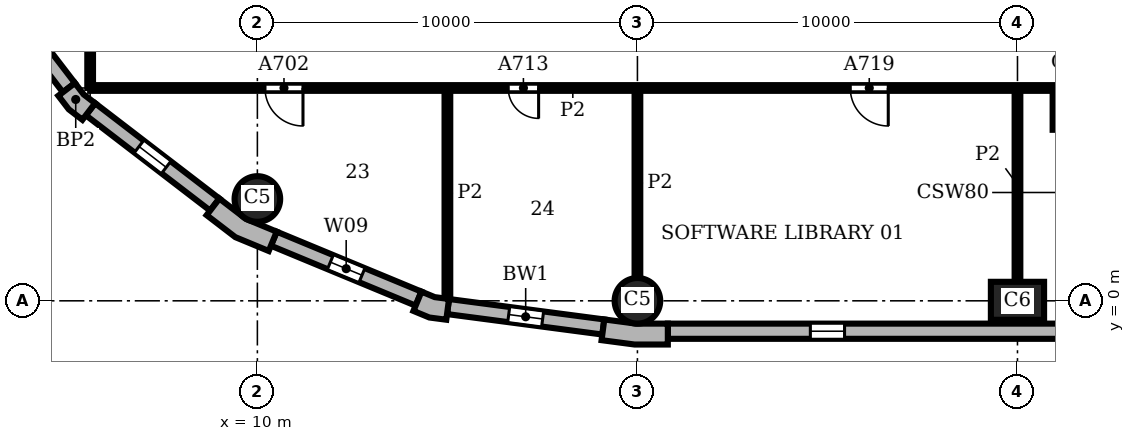
"""IFC4 building model, lengths in metres.
Left out: names, types, materials, properties, quantities, classifications, styles, units other than length and angle.
Written with IfcOpenShell. Run it as: python <this file> out.ifc"""

import sys

from ifc_helpers import new_model, si_unit, direction, frame, frame_2d, origin, origin_2d, place, context, subcontext, project, spatial, polyline, rectangle, circle, outline, extrude, element, fill, save


model = new_model("IFC4")
c1 = context("Model", 3, precision=1e-05, world=origin(), true_north=direction((0.0, 1.0)))
c2 = subcontext(c1, "Body", "Model", "MODEL_VIEW")
j1 = project(units=[si_unit("LENGTHUNIT", "METRE"), si_unit("PLANEANGLEUNIT", "RADIAN")], contexts=[c1])
p1 = place(None, origin())
s1 = spatial("IfcSite", under=j1, at=p1, CompositionType="ELEMENT")
p2 = place(p1, origin())
s2 = spatial("IfcBuilding", under=s1, at=p2, CompositionType="ELEMENT")
p3 = place(p2, frame((0.0, 0.0, 86.1)))
s3 = spatial("IfcBuildingStorey", under=s2, at=p3, CompositionType="ELEMENT", Elevation=86.1)
p4 = place(p3, frame((20.0, 0.0, 0.0), z_axis=(0.0, 0.0, 1.0), x_axis=(1.0, 0.0, 0.0)))
e1 = element("IfcColumn", 1, at=p4, inside=s3, PredefinedType="COLUMN", context=c2, shape_type="SweptSolid", body=[
    extrude(circle(Radius=0.6, at=origin_2d()), origin(), (0.0, 0.0, 1.0), 3.9),
])
p5 = place(p3, frame((30.0, 0.0, 0.0), z_axis=(0.0, 0.0, 1.0), x_axis=(1.0, 0.0, 0.0)))
e2 = element("IfcColumn", 2, at=p5, inside=s3, PredefinedType="COLUMN", context=c2, shape_type="SweptSolid", body=[
    extrude(rectangle(XDim=1.4, YDim=1.0, at=origin_2d()), origin(), (0.0, 0.0, 1.0), 3.9),
])
p6 = place(p3, frame((10.0, 2.679, 0.0), z_axis=(0.0, 0.0, 1.0), x_axis=(1.0, 0.0, 0.0)))
e3 = element("IfcColumn", 3, at=p6, inside=s3, PredefinedType="COLUMN", context=c2, shape_type="SweptSolid", body=[
    extrude(circle(Radius=0.6, at=origin_2d()), origin(), (0.0, 0.0, 1.0), 3.9),
])
p7 = place(p3, origin())
e4 = element("IfcWall", 4, at=p7, inside=s3, PredefinedType="SOLIDWALL", context=c2, shape_type="SweptSolid", body=[
    extrude(outline(polyline([(19.076, -0.887), (19.057, -1.036), (19.925, -1.15), (20.8, -1.15), (20.8, -1.0), (20.8, -0.6), (19.961, -0.6), (19.128, -0.49), (19.076, -0.887)])), origin(), (0.0, 0.0, 1.0), 3.9),
])
e5 = element("IfcWall", 5, at=p7, inside=s3, PredefinedType="SOLIDWALL", context=c2, shape_type="SweptSolid", body=[
    extrude(outline(polyline([(4.882, 5.487), (4.763, 5.396), (5.038, 5.038), (5.396, 4.763), (5.487, 4.882), (5.731, 5.199), (5.43, 5.43), (5.199, 5.731), (4.882, 5.487)])), origin(), (0.0, 0.0, 1.0), 3.9),
])
e6 = element("IfcWall", 6, at=p7, inside=s3, PredefinedType="SOLIDWALL", context=c2, shape_type="SweptSolid", body=[
    extrude(outline(polyline([(8.757, 2.373), (8.665, 2.254), (9.42, 1.675), (10.299, 1.311), (10.356, 1.449), (10.51, 1.819), (9.698, 2.155), (9.0, 2.69), (8.757, 2.373)])), origin(), (0.0, 0.0, 1.0), 3.9),
])
e7 = element("IfcWall", 7, at=p7, inside=s3, PredefinedType="SOLIDWALL", context=c2, shape_type="SweptSolid", body=[
    extrude(outline(polyline([(14.164, -0.128), (14.106, -0.266), (14.523, -0.439), (14.971, -0.498), (14.99, -0.349), (15.043, 0.047), (14.667, 0.097), (14.317, 0.242), (14.164, -0.128)])), origin(), (0.0, 0.0, 1.0), 3.9),
])
p8 = place(p3, frame((20.8, -0.8, 0.0), z_axis=(0.0, 0.0, 1.0), x_axis=(1.0, 0.0, 0.0)))
e8 = element("IfcWall", 8, at=p8, inside=s3, PredefinedType="SOLIDWALL", context=c2, shape_type="SweptSolid", body=[
    extrude(rectangle(XDim=48.4, YDim=0.4, at=frame_2d((24.2, 0.0))), origin(), (0.0, 0.0, 1.0), 3.9),
])
p9 = place(p8, frame((3.75, 0.0, 0.9)))
e9 = element("IfcOpeningElement", 9, at=p9, cuts=e8, PredefinedType="OPENING", context=c2, shape_type="SweptSolid", body=[
    extrude(rectangle(XDim=0.9, YDim=2.35, at=frame_2d((0.45, 1.175))), frame((0.0, 0.21, 0.0), z_axis=(0.0, -1.0, 0.0), x_axis=(1.0, 0.0, 0.0)), (0.0, 0.0, 1.0), 0.42),
])
p10 = place(p8, frame((13.75, 0.0, 0.9)))
e10 = element("IfcOpeningElement", 10, at=p10, cuts=e8, PredefinedType="OPENING", context=c2, shape_type="SweptSolid", body=[
    extrude(rectangle(XDim=0.9, YDim=2.35, at=frame_2d((0.45, 1.175))), frame((0.0, 0.21, 0.0), z_axis=(0.0, -1.0, 0.0), x_axis=(1.0, 0.0, 0.0)), (0.0, 0.0, 1.0), 0.42),
])
p11 = place(p8, frame((23.75, 0.0, 0.9)))
e11 = element("IfcOpeningElement", 11, at=p11, cuts=e8, PredefinedType="OPENING", context=c2, shape_type="SweptSolid", body=[
    extrude(rectangle(XDim=0.9, YDim=2.35, at=frame_2d((0.45, 1.175))), frame((0.0, 0.21, 0.0), z_axis=(0.0, -1.0, 0.0), x_axis=(1.0, 0.0, 0.0)), (0.0, 0.0, 1.0), 0.42),
])
p12 = place(p8, frame((33.75, 0.0, 0.9)))
e12 = element("IfcOpeningElement", 12, at=p12, cuts=e8, PredefinedType="OPENING", context=c2, shape_type="SweptSolid", body=[
    extrude(rectangle(XDim=0.9, YDim=2.35, at=frame_2d((0.45, 1.175))), frame((0.0, 0.21, 0.0), z_axis=(0.0, -1.0, 0.0), x_axis=(1.0, 0.0, 0.0)), (0.0, 0.0, 1.0), 0.42),
])
p13 = place(p8, frame((43.75, 0.0, 0.9)))
e13 = element("IfcOpeningElement", 13, at=p13, cuts=e8, PredefinedType="OPENING", context=c2, shape_type="SweptSolid", body=[
    extrude(rectangle(XDim=0.9, YDim=2.35, at=frame_2d((0.45, 1.175))), frame((0.0, 0.21, 0.0), z_axis=(0.0, -1.0, 0.0), x_axis=(1.0, 0.0, 0.0)), (0.0, 0.0, 1.0), 0.42),
])
p14 = place(p3, frame((2.532, 8.878, 0.0), z_axis=(0.0, 0.0, 1.0), x_axis=(0.608759824817, -0.793354571229, 0.0)))
e14 = element("IfcWall", 14, at=p14, inside=s3, PredefinedType="SOLIDWALL", context=c2, shape_type="SweptSolid", body=[
    extrude(rectangle(XDim=4.121, YDim=0.4, at=frame_2d((2.061, 0.0))), origin(), (0.0, 0.0, 1.0), 3.9),
])
p15 = place(p14, frame((1.611, 0.0, 0.9)))
e15 = element("IfcOpeningElement", 15, at=p15, cuts=e14, PredefinedType="OPENING", context=c2, shape_type="SweptSolid", body=[
    extrude(rectangle(XDim=0.9, YDim=2.35, at=frame_2d((0.45, 1.175))), frame((0.0, 0.21, 0.0), z_axis=(0.0, -1.0, 0.0), x_axis=(1.0, 0.0, 0.0)), (0.0, 0.0, 1.0), 0.42),
])
p16 = place(p3, frame((5.609, 5.041, 0.0), z_axis=(0.0, 0.0, 1.0), x_axis=(0.793354571229, -0.608759824817, 0.0)))
e16 = element("IfcWall", 16, at=p16, inside=s3, PredefinedType="SOLIDWALL", context=c2, shape_type="SweptSolid", body=[
    extrude(rectangle(XDim=4.121, YDim=0.4, at=frame_2d((2.061, 0.0))), origin(), (0.0, 0.0, 1.0), 3.9),
])
p17 = place(p16, frame((1.611, 0.0, 0.9)))
e17 = element("IfcOpeningElement", 17, at=p17, cuts=e16, PredefinedType="OPENING", context=c2, shape_type="SweptSolid", body=[
    extrude(rectangle(XDim=0.9, YDim=2.35, at=frame_2d((0.45, 1.175))), frame((0.0, 0.21, 0.0), z_axis=(0.0, -1.0, 0.0), x_axis=(1.0, 0.0, 0.0)), (0.0, 0.0, 1.0), 0.42),
])
p18 = place(p3, frame((10.433, 1.634, 0.0), z_axis=(0.0, 0.0, 1.0), x_axis=(0.923863744394, -0.382721546029, 0.0)))
e18 = element("IfcWall", 18, at=p18, inside=s3, PredefinedType="SOLIDWALL", context=c2, shape_type="SweptSolid", body=[
    extrude(rectangle(XDim=4.121, YDim=0.4, at=frame_2d((2.061, 0.0))), origin(), (0.0, 0.0, 1.0), 3.9),
])
p19 = place(p18, frame((1.611, 0.0, 0.9)))
e19 = element("IfcOpeningElement", 19, at=p19, cuts=e18, PredefinedType="OPENING", context=c2, shape_type="SweptSolid", body=[
    extrude(rectangle(XDim=0.9, YDim=2.35, at=frame_2d((0.45, 1.175))), frame((0.0, 0.21, 0.0), z_axis=(0.0, -1.0, 0.0), x_axis=(1.0, 0.0, 0.0)), (0.0, 0.0, 1.0), 0.42),
])
p20 = place(p3, frame((15.017, -0.151, 0.0), z_axis=(0.0, 0.0, 1.0), x_axis=(0.991446429508, -0.130514280502, 0.0)))
e20 = element("IfcWall", 20, at=p20, inside=s3, PredefinedType="SOLIDWALL", context=c2, shape_type="SweptSolid", body=[
    extrude(rectangle(XDim=4.121, YDim=0.4, at=frame_2d((2.061, 0.0))), origin(), (0.0, 0.0, 1.0), 3.9),
])
p21 = place(p20, frame((1.611, 0.0, 0.9)))
e21 = element("IfcOpeningElement", 21, at=p21, cuts=e20, PredefinedType="OPENING", context=c2, shape_type="SweptSolid", body=[
    extrude(rectangle(XDim=0.9, YDim=2.35, at=frame_2d((0.45, 1.175))), frame((0.0, 0.21, 0.0), z_axis=(0.0, -1.0, 0.0), x_axis=(1.0, 0.0, 0.0)), (0.0, 0.0, 1.0), 0.42),
])
p22 = place(p3, frame((5.6, 5.6, 0.0), z_axis=(0.0, 0.0, 1.0), x_axis=(0.0, 1.0, 0.0)))
e22 = element("IfcWall", 22, at=p22, inside=s3, PredefinedType="PARTITIONING", context=c2, shape_type="SweptSolid", body=[
    extrude(rectangle(XDim=54.4, YDim=0.15, at=frame_2d((27.2, 0.0))), origin(), (0.0, 0.0, 1.0), 3.58),
])
p23 = place(p22, frame((40.8, 0.0, 0.0)))
e23 = element("IfcOpeningElement", 23, at=p23, cuts=e22, PredefinedType="OPENING", context=c2, shape_type="SweptSolid", body=[
    extrude(rectangle(XDim=1.8, YDim=2.1, at=frame_2d((0.9, 1.05))), frame((0.0, 0.085, 0.0), z_axis=(0.0, -1.0, 0.0), x_axis=(1.0, 0.0, 0.0)), (0.0, 0.0, 1.0), 0.17),
])
p24 = place(p3, frame((15.0, 0.063, 0.0), z_axis=(0.0, 0.0, 1.0), x_axis=(0.0, 1.0, 0.0)))
e24 = element("IfcWall", 24, at=p24, inside=s3, PredefinedType="PARTITIONING", context=c2, shape_type="SweptSolid", body=[
    extrude(rectangle(XDim=5.537, YDim=0.15, at=frame_2d((2.769, 0.0))), origin(), (0.0, 0.0, 1.0), 3.58),
])
p25 = place(p3, frame((20.0, 0.6, 0.0), z_axis=(0.0, 0.0, 1.0), x_axis=(0.0, 1.0, 0.0)))
e25 = element("IfcWall", 25, at=p25, inside=s3, PredefinedType="PARTITIONING", context=c2, shape_type="SweptSolid", body=[
    extrude(rectangle(XDim=5.0, YDim=0.15, at=frame_2d((2.5, 0.0))), origin(), (0.0, 0.0, 1.0), 3.58),
])
p26 = place(p3, frame((30.0, 0.5, 0.0), z_axis=(0.0, 0.0, 1.0), x_axis=(0.0, 1.0, 0.0)))
e26 = element("IfcWall", 26, at=p26, inside=s3, PredefinedType="PARTITIONING", context=c2, shape_type="SweptSolid", body=[
    extrude(rectangle(XDim=5.1, YDim=0.15, at=frame_2d((2.55, 0.0))), origin(), (0.0, 0.0, 1.0), 3.58),
])
p27 = place(p3, frame((31.0, 4.5, 0.0), z_axis=(0.0, 0.0, 1.0), x_axis=(0.0, 1.0, 0.0)))
e27 = element("IfcWall", 27, at=p27, inside=s3, PredefinedType="PARTITIONING", context=c2, shape_type="SweptSolid", body=[
    extrude(rectangle(XDim=1.1, YDim=0.15, at=frame_2d((0.55, 0.0))), origin(), (0.0, 0.0, 1.0), 3.58),
])
p28 = place(p3, frame((5.6, 5.6, 0.0), z_axis=(0.0, 0.0, 1.0), x_axis=(1.0, 0.0, 0.0)))
e28 = element("IfcWall", 28, at=p28, inside=s3, PredefinedType="PARTITIONING", context=c2, shape_type="SweptSolid", body=[
    extrude(rectangle(XDim=25.4, YDim=0.15, at=frame_2d((12.7, 0.0))), origin(), (0.0, 0.0, 1.0), 3.58),
])
p29 = place(p28, frame((4.6, 0.0, 0.0)))
e29 = element("IfcOpeningElement", 29, at=p29, cuts=e28, PredefinedType="OPENING", context=c2, shape_type="SweptSolid", body=[
    extrude(rectangle(XDim=1.0, YDim=2.1, at=frame_2d((0.5, 1.05))), frame((0.0, 0.085, 0.0), z_axis=(0.0, -1.0, 0.0), x_axis=(1.0, 0.0, 0.0)), (0.0, 0.0, 1.0), 0.17),
])
p30 = place(p28, frame((11.0, 0.0, 0.0)))
e30 = element("IfcOpeningElement", 30, at=p30, cuts=e28, PredefinedType="OPENING", context=c2, shape_type="SweptSolid", body=[
    extrude(rectangle(XDim=0.8, YDim=2.1, at=frame_2d((0.4, 1.05))), frame((0.0, 0.085, 0.0), z_axis=(0.0, -1.0, 0.0), x_axis=(1.0, 0.0, 0.0)), (0.0, 0.0, 1.0), 0.17),
])
p31 = place(p28, frame((20.0, 0.0, 0.0)))
e31 = element("IfcOpeningElement", 31, at=p31, cuts=e28, PredefinedType="OPENING", context=c2, shape_type="SweptSolid", body=[
    extrude(rectangle(XDim=1.0, YDim=2.1, at=frame_2d((0.5, 1.05))), frame((0.0, 0.085, 0.0), z_axis=(0.0, -1.0, 0.0), x_axis=(1.0, 0.0, 0.0)), (0.0, 0.0, 1.0), 0.17),
])
p32 = place(p9, origin())
e32 = element("IfcWindow", 32, at=p32, inside=s3, PartitioningType="SINGLE_PANEL", PredefinedType="WINDOW", context=c2, shape_type="SweptSolid", body=[
    extrude(rectangle(XDim=0.9, YDim=2.35, at=frame_2d((0.45, 1.175))), frame((0.0, 0.16, 0.0), z_axis=(0.0, -1.0, 0.0), x_axis=(1.0, 0.0, 0.0)), (0.0, 0.0, 1.0), 0.06),
])
fill(e9, e32)
p33 = place(p17, origin())
e33 = element("IfcWindow", 33, at=p33, inside=s3, PartitioningType="SINGLE_PANEL", PredefinedType="WINDOW", context=c2, shape_type="SweptSolid", body=[
    extrude(rectangle(XDim=0.9, YDim=2.35, at=frame_2d((0.45, 1.175))), frame((0.0, 0.16, 0.0), z_axis=(0.0, -1.0, 0.0), x_axis=(1.0, 0.0, 0.0)), (0.0, 0.0, 1.0), 0.06),
])
fill(e17, e33)
p34 = place(p19, origin())
e34 = element("IfcWindow", 34, at=p34, inside=s3, PartitioningType="SINGLE_PANEL", PredefinedType="WINDOW", context=c2, shape_type="SweptSolid", body=[
    extrude(rectangle(XDim=0.9, YDim=2.35, at=frame_2d((0.45, 1.175))), frame((0.0, 0.16, 0.0), z_axis=(0.0, -1.0, 0.0), x_axis=(1.0, 0.0, 0.0)), (0.0, 0.0, 1.0), 0.06),
])
fill(e19, e34)
p35 = place(p21, origin())
e35 = element("IfcWindow", 35, at=p35, inside=s3, PartitioningType="SINGLE_PANEL", PredefinedType="WINDOW", context=c2, shape_type="SweptSolid", body=[
    extrude(rectangle(XDim=0.9, YDim=2.35, at=frame_2d((0.45, 1.175))), frame((0.0, 0.16, 0.0), z_axis=(0.0, -1.0, 0.0), x_axis=(1.0, 0.0, 0.0)), (0.0, 0.0, 1.0), 0.06),
])
fill(e21, e35)
p36 = place(p29, frame((1.0, 0.0, 0.0), z_axis=(0.0, 0.0, 1.0), x_axis=(-1.0, 0.0, 0.0)))
e36 = element("IfcDoor", 36, at=p36, inside=s3, OperationType="SINGLE_SWING_LEFT", PredefinedType="DOOR", context=c2, shape_type="SweptSolid", body=[
    extrude(rectangle(XDim=1.0, YDim=2.1, at=frame_2d((0.5, 1.05))), frame((0.0, 0.025, 0.0), z_axis=(0.0, -1.0, 0.0), x_axis=(1.0, 0.0, 0.0)), (0.0, 0.0, 1.0), 0.05),
])
fill(e29, e36)
p37 = place(p30, frame((0.8, 0.0, 0.0), z_axis=(0.0, 0.0, 1.0), x_axis=(-1.0, 0.0, 0.0)))
e37 = element("IfcDoor", 37, at=p37, inside=s3, OperationType="SINGLE_SWING_LEFT", PredefinedType="DOOR", context=c2, shape_type="SweptSolid", body=[
    extrude(rectangle(XDim=0.8, YDim=2.1, at=frame_2d((0.4, 1.05))), frame((0.0, 0.025, 0.0), z_axis=(0.0, -1.0, 0.0), x_axis=(1.0, 0.0, 0.0)), (0.0, 0.0, 1.0), 0.05),
])
fill(e30, e37)
p38 = place(p31, frame((1.0, 0.0, 0.0), z_axis=(0.0, 0.0, 1.0), x_axis=(-1.0, 0.0, 0.0)))
e38 = element("IfcDoor", 38, at=p38, inside=s3, OperationType="SINGLE_SWING_LEFT", PredefinedType="DOOR", context=c2, shape_type="SweptSolid", body=[
    extrude(rectangle(XDim=1.0, YDim=2.1, at=frame_2d((0.5, 1.05))), frame((0.0, 0.025, 0.0), z_axis=(0.0, -1.0, 0.0), x_axis=(1.0, 0.0, 0.0)), (0.0, 0.0, 1.0), 0.05),
])
fill(e31, e38)
save(model, sys.argv[1])
